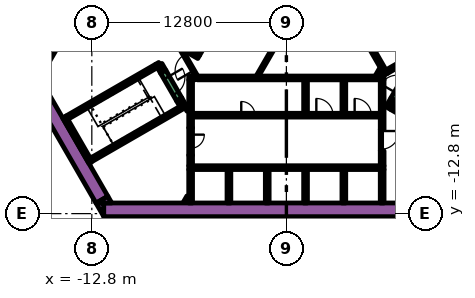
"""IFC4 building model, lengths in metres.
Left out: names, types, materials, properties, quantities, classifications, styles, units other than length and angle.
Written with IfcOpenShell. Run it as: python <this file> out.ifc"""

import sys

from ifc_helpers import new_model, si_unit, direction, frame, frame_2d, origin, place, context, subcontext, project, spatial, polyline, rectangle, outline, extrude, element, fill, save


model = new_model("IFC4")
c1 = context("Model", 3, precision=1e-05, world=origin(), true_north=direction((0.0, 1.0)))
c2 = subcontext(c1, "Body", "Model", "MODEL_VIEW")
j1 = project(units=[si_unit("LENGTHUNIT", "METRE"), si_unit("PLANEANGLEUNIT", "RADIAN")], contexts=[c1])
p1 = place(None, origin())
s1 = spatial("IfcSite", under=j1, at=p1, CompositionType="ELEMENT")
p2 = place(p1, origin())
s2 = spatial("IfcBuilding", under=s1, at=p2, CompositionType="ELEMENT")
p3 = place(p2, frame((0.0, 0.0, 11.4)))
s3 = spatial("IfcBuildingStorey", under=s2, at=p3, CompositionType="ELEMENT", Elevation=11.4)
p4 = place(p3, frame((6.776, 13.364, 0.0), z_axis=(0.0, 0.0, 1.0), x_axis=(0.500004177138, -0.8660229921, 0.0)))
e1 = element("IfcWall", 1, at=p4, inside=s3, PredefinedType="SOLIDWALL", context=c2, shape_type="SweptSolid", body=[
    extrude(rectangle(XDim=20.204, YDim=0.9, at=frame_2d((10.102, 0.0))), origin(), (0.0, 0.0, 1.0), 4.8),
])
p5 = place(p3, frame((-12.019, -12.55, 0.0), z_axis=(0.0, 0.0, 1.0), x_axis=(1.0, 0.0, 0.0)))
e2 = element("IfcWall", 2, at=p5, inside=s3, PredefinedType="SOLIDWALL", context=c2, shape_type="SweptSolid", body=[
    extrude(rectangle(XDim=21.63, YDim=0.9, at=frame_2d((10.815, 0.0))), origin(), (0.0, 0.0, 1.0), 4.8),
])
p6 = place(p3, origin())
e3 = element("IfcWall", 3, at=p6, inside=s3, PredefinedType="SOLIDWALL", context=c2, shape_type="SweptSolid", body=[
    extrude(outline(polyline([(-12.529, -12.1), (-12.021, -12.1), (-12.021, -12.98), (-12.529, -12.1)])), origin(), (0.0, 0.0, 1.0), 4.8),
])
p7 = place(p3, frame((-12.134, -11.883, 0.0), z_axis=(0.0, 0.0, 1.0), x_axis=(-0.500005339912, 0.866022320763, 0.0)))
e4 = element("IfcWall", 4, at=p7, inside=s3, PredefinedType="SOLIDWALL", context=c2, shape_type="SweptSolid", body=[
    extrude(rectangle(XDim=9.488, YDim=0.9, at=frame_2d((4.744, 0.0))), origin(), (0.0, 0.0, 1.0), 4.8),
])
e5 = element("IfcWall", 5, at=p6, inside=s3, PredefinedType="SOLIDWALL", context=c2, shape_type="SweptSolid", body=[
    extrude(outline(polyline([(-11.489, -12.1), (-12.505, -12.1), (-11.743, -11.66), (-11.489, -12.1)])), origin(), (0.0, 0.0, 1.0), 4.8),
])
p8 = place(p3, frame((12.84, -9.261, 0.0), z_axis=(0.0, 0.0, 1.0), x_axis=(-0.866013990052, 0.500019768644, 0.0)))
e6 = element("IfcWall", 6, at=p8, inside=s3, PredefinedType="SOLIDWALL", context=c2, shape_type="SweptSolid", body=[
    extrude(rectangle(XDim=6.8, YDim=0.25, at=frame_2d((3.4, 0.0))), origin(), (0.0, 0.0, 1.0), 4.8),
])
p9 = place(p3, frame((6.78, -5.906, 0.0), z_axis=(0.0, 0.0, 1.0), x_axis=(0.500223362819, 0.865896406789, 0.0)))
e7 = element("IfcWall", 7, at=p9, inside=s3, PredefinedType="SOLIDWALL", context=c2, shape_type="SweptSolid", body=[
    extrude(rectangle(XDim=0.675, YDim=0.25, at=frame_2d((0.337, 0.0))), origin(), (0.0, 0.0, 1.0), 4.8),
])
p10 = place(p3, frame((-12.885, -9.431, 0.0), z_axis=(0.0, 0.0, 1.0), x_axis=(-0.500020560727, 0.866013532718, 0.0)))
e8 = element("IfcWall", 8, at=p10, inside=s3, PredefinedType="SOLIDWALL", context=c2, shape_type="SweptSolid", body=[
    extrude(rectangle(XDim=3.45, YDim=0.25, at=frame_2d((1.725, 0.0))), origin(), (0.0, 0.0, 1.0), 4.8),
])
p11 = place(p3, frame((-14.44, -6.49, 0.0), z_axis=(0.0, 0.0, 1.0), x_axis=(0.866022966069, 0.500004222222, 0.0)))
e9 = element("IfcWall", 9, at=p11, inside=s3, PredefinedType="SOLIDWALL", context=c2, shape_type="SweptSolid", body=[
    extrude(rectangle(XDim=6.8, YDim=0.25, at=frame_2d((3.4, 0.0))), origin(), (0.0, 0.0, 1.0), 4.8),
])
p12 = place(p3, frame((-8.168, -3.503, 0.0), z_axis=(0.0, 0.0, 1.0), x_axis=(-0.499952099219, 0.866053057547, 0.0)))
e10 = element("IfcWall", 10, at=p12, inside=s3, PredefinedType="SOLIDWALL", context=c2, shape_type="SweptSolid", body=[
    extrude(rectangle(XDim=0.675, YDim=0.25, at=frame_2d((0.337, 0.0))), origin(), (0.0, 0.0, 1.0), 4.8),
])
p13 = place(p3, frame((-12.84, -9.261, 0.0), z_axis=(0.0, 0.0, 1.0), x_axis=(0.866016039709, 0.500016218704, 0.0)))
e11 = element("IfcWall", 11, at=p13, inside=s3, PredefinedType="SOLIDWALL", context=c2, shape_type="SweptSolid", body=[
    extrude(rectangle(XDim=7.05, YDim=0.25, at=frame_2d((3.525, 0.0))), origin(), (0.0, 0.0, 1.0), 4.8),
])
p14 = place(p3, frame((-6.905, -5.69, 0.0), z_axis=(0.0, 0.0, 1.0), x_axis=(-0.500402024738, 0.865793170242, 0.0)))
e12 = element("IfcWall", 12, at=p14, inside=s3, PredefinedType="SOLIDWALL", context=c2, shape_type="SweptSolid", body=[
    extrude(rectangle(XDim=0.425, YDim=0.25, at=frame_2d((0.212, 0.0))), origin(), (0.0, 0.0, 1.0), 4.8),
])
p15 = place(p3, frame((-6.425, -9.775, 0.0), z_axis=(0.0, 0.0, 1.0), x_axis=(1.0, 0.0, 0.0)))
e13 = element("IfcWall", 13, at=p15, inside=s3, PredefinedType="SOLIDWALL", context=c2, shape_type="SweptSolid", body=[
    extrude(rectangle(XDim=12.85, YDim=0.25, at=frame_2d((6.425, 0.0))), origin(), (0.0, 0.0, 1.0), 4.8),
])
p16 = place(p3, frame((-6.3, -9.9, 0.0), z_axis=(0.0, 0.0, 1.0), x_axis=(0.0, -1.0, 0.0)))
e14 = element("IfcWall", 14, at=p16, inside=s3, PredefinedType="SOLIDWALL", context=c2, shape_type="SweptSolid", body=[
    extrude(rectangle(XDim=2.2, YDim=0.25, at=frame_2d((1.1, 0.0))), origin(), (0.0, 0.0, 1.0), 4.8),
])
p17 = place(p3, frame((-6.3, -9.65, 0.0), z_axis=(0.0, 0.0, 1.0), x_axis=(0.0, 1.0, 0.0)))
e15 = element("IfcWall", 15, at=p17, inside=s3, PredefinedType="SOLIDWALL", context=c2, shape_type="SweptSolid", body=[
    extrude(rectangle(XDim=0.695, YDim=0.25, at=frame_2d((0.348, 0.0))), origin(), (0.0, 0.0, 1.0), 4.8),
])
p18 = place(p3, frame((-5.845, -3.875, 0.0), z_axis=(0.0, 0.0, 1.0), x_axis=(1.0, 0.0, 0.0)))
e16 = element("IfcWall", 16, at=p18, inside=s3, PredefinedType="SOLIDWALL", context=c2, shape_type="SweptSolid", body=[
    extrude(rectangle(XDim=12.27, YDim=0.25, at=frame_2d((6.135, 0.0))), origin(), (0.0, 0.0, 1.0), 4.8),
])
p19 = place(p3, frame((-6.425, -3.875, 0.0), z_axis=(0.0, 0.0, 1.0), x_axis=(1.0, 0.0, 0.0)))
e17 = element("IfcWall", 17, at=p19, inside=s3, PredefinedType="SOLIDWALL", context=c2, shape_type="SweptSolid", body=[
    extrude(rectangle(XDim=0.428, YDim=0.25, at=frame_2d((0.214, 0.0))), origin(), (0.0, 0.0, 1.0), 4.8),
])
p20 = place(p3, frame((6.3, -7.27, 0.0), z_axis=(0.0, 0.0, 1.0), x_axis=(0.0, 1.0, 0.0)))
e18 = element("IfcWall", 18, at=p20, inside=s3, PredefinedType="SOLIDWALL", context=c2, shape_type="SweptSolid", body=[
    extrude(rectangle(XDim=3.27, YDim=0.25, at=frame_2d((1.635, 0.0))), origin(), (0.0, 0.0, 1.0), 4.8),
])
p21 = place(p3, frame((6.3, -8.672, 0.0), z_axis=(0.0, 0.0, 1.0), x_axis=(0.0, -1.0, 0.0)))
e19 = element("IfcWall", 19, at=p21, inside=s3, PredefinedType="SOLIDWALL", context=c2, shape_type="SweptSolid", body=[
    extrude(rectangle(XDim=0.978, YDim=0.25, at=frame_2d((0.489, 0.0))), origin(), (0.0, 0.0, 1.0), 4.8),
])
for number, where, z_axis, x_axis in (
    (20, (3.78, -4.0, 0.0), (0.0, 0.0, 1.0), (0.0, -1.0, 0.0)),
    (21, (1.26, -4.0, 0.0), (0.0, 0.0, 1.0), (0.0, -1.0, 0.0)),
):
    element("IfcWall", number, at=place(p3, frame(where, z_axis=z_axis, x_axis=x_axis)), inside=s3, PredefinedType="SOLIDWALL", context=c2, shape_type="SweptSolid", body=[
        extrude(rectangle(XDim=2.2, YDim=0.25, at=frame_2d((1.1, 0.0))), origin(), (0.0, 0.0, 1.0), 4.8),
    ])
p22 = place(p3, frame((-6.3, -4.0, 0.0), z_axis=(0.0, 0.0, 1.0), x_axis=(0.0, -1.0, 0.0)))
e22 = element("IfcWall", 22, at=p22, inside=s3, PredefinedType="SOLIDWALL", context=c2, shape_type="SweptSolid", body=[
    extrude(rectangle(XDim=3.154, YDim=0.25, at=frame_2d((1.577, 0.0))), origin(), (0.0, 0.0, 1.0), 4.8),
])
for number, where, z_axis, x_axis in (
    (23, (6.3, -9.9, 0.0), (0.0, 0.0, 1.0), (0.0, -1.0, 0.0)),
    (24, (3.78, -9.9, 0.0), (0.0, 0.0, 1.0), (0.0, -1.0, 0.0)),
    (25, (1.26, -9.9, 0.0), (0.0, 0.0, 1.0), (0.0, -1.0, 0.0)),
    (26, (-1.26, -9.9, 0.0), (0.0, 0.0, 1.0), (0.0, -1.0, 0.0)),
    (27, (-3.78, -9.9, 0.0), (0.0, 0.0, 1.0), (0.0, -1.0, 0.0)),
):
    element("IfcWall", number, at=place(p3, frame(where, z_axis=z_axis, x_axis=x_axis)), inside=s3, PredefinedType="SOLIDWALL", context=c2, shape_type="SweptSolid", body=[
        extrude(rectangle(XDim=2.2, YDim=0.25, at=frame_2d((1.1, 0.0))), origin(), (0.0, 0.0, 1.0), 4.8),
    ])
e28 = element("IfcWall", 28, at=p6, inside=s3, PredefinedType="SOLIDWALL", context=c2, shape_type="SweptSolid", body=[
    extrude(outline(polyline([(6.552, -3.348), (6.677, -3.564), (6.46, -3.689), (4.897, -0.981), (0.332, 6.925), (0.335, 6.925), (0.335, 6.925), (0.335, 6.925), (0.335, 7.075), (0.335, 7.075), (0.335, 7.075), (0.245, 7.075), (0.079, 7.363), (0.035, 7.439), (0.252, 7.564), (0.377, 7.348), (6.552, -3.348)])), origin(), (0.0, 0.0, 1.0), 4.8),
])
p23 = place(p3, frame((6.614, -3.456, 0.0), z_axis=(0.0, 0.0, 1.0), x_axis=(0.86602447079, 0.500001615989, 0.0)))
e29 = element("IfcWall", 29, at=p23, inside=s3, PredefinedType="SOLIDWALL", context=c2, shape_type="SweptSolid", body=[
    extrude(rectangle(XDim=3.154, YDim=0.25, at=frame_2d((1.577, 0.0))), origin(), (0.0, 0.0, 1.0), 4.8),
])
e30 = element("IfcWall", 30, at=p6, inside=s3, PredefinedType="SOLIDWALL", context=c2, shape_type="SweptSolid", body=[
    extrude(outline(polyline([(-5.922, -2.257), (-5.922, -2.257), (-5.705, -2.382), (-5.83, -2.598), (-6.829, -2.021), (-6.88, -1.934), (-6.88, -1.934), (-6.93, -1.963), (-7.952, -1.373), (-7.827, -1.156), (-5.922, -2.257)])), origin(), (0.0, 0.0, 1.0), 4.8),
])
p24 = place(p3, frame((-6.708, -12.068, 0.0), z_axis=(0.0, 0.0, 1.0), x_axis=(0.500000789788, 0.8660249478, 0.0)))
e31 = element("IfcWall", 31, at=p24, inside=s3, PredefinedType="PARTITIONING", context=c2, shape_type="SweptSolid", body=[
    extrude(rectangle(XDim=0.456, YDim=0.15, at=frame_2d((0.228, 0.0))), origin(), (0.0, 0.0, 1.0), 3.9),
])
p25 = place(p3, frame((-6.534, -12.068, 0.0), z_axis=(0.0, 0.0, 1.0), x_axis=(0.500240224089, 0.865886665912, 0.0)))
e32 = element("IfcWall", 32, at=p25, inside=s3, PredefinedType="PARTITIONING", context=c2, shape_type="SweptSolid", body=[
    extrude(rectangle(XDim=0.109, YDim=0.15, at=frame_2d((0.054, 0.0))), origin(), (0.0, 0.0, 1.0), 3.9),
])
p26 = place(p3, frame((-6.48, -6.027, 0.0), z_axis=(0.0, 0.0, 1.0), x_axis=(-0.499927229454, 0.866067413802, 0.0)))
e33 = element("IfcWall", 33, at=p26, inside=s3, PredefinedType="PARTITIONING", context=c2, shape_type="SweptSolid", body=[
    extrude(rectangle(XDim=0.929, YDim=0.15, at=frame_2d((0.464, 0.0))), origin(), (0.0, 0.0, 1.0), 4.8),
])
for number, where, z_axis, x_axis in (
    (34, (-8.252, -2.958, 0.0), (0.0, 0.0, 1.0), (0.5, -0.866, 0.0)),
    (35, (6.945, -5.222, 0.0), (0.0, 0.0, 1.0), (-0.5, -0.866, 0.0)),
):
    element("IfcWall", number, at=place(p3, frame(where, z_axis=z_axis, x_axis=x_axis)), inside=s3, PredefinedType="PARTITIONING", context=c2, shape_type="SweptSolid", body=[
        extrude(rectangle(XDim=0.514, YDim=0.15, at=frame_2d((0.257, 0.0))), origin(), (0.0, 0.0, 1.0), 3.9),
    ])
p27 = place(p3, frame((5.936, -3.718, 0.0), z_axis=(0.0, 0.0, 1.0), x_axis=(0.499890179513, 0.866088799389, 0.0)))
e36 = element("IfcWall", 36, at=p27, inside=s3, PredefinedType="PARTITIONING", context=c2, shape_type="SweptSolid", body=[
    extrude(rectangle(XDim=0.504, YDim=0.15, at=frame_2d((0.252, 0.0))), origin(), (0.0, 0.0, 1.0), 3.9),
])
p28 = place(p3, frame((-1.887, -3.718, 0.0), z_axis=(0.0, 0.0, 1.0), x_axis=(0.500033287521, 0.866006184372, 0.0)))
e37 = element("IfcWall", 37, at=p28, inside=s3, PredefinedType="PARTITIONING", context=c2, shape_type="SweptSolid", body=[
    extrude(rectangle(XDim=3.263, YDim=0.15, at=frame_2d((1.632, 0.0))), origin(), (0.0, 0.0, 1.0), 3.9),
])
p29 = place(p3, frame((-6.175, -6.325, 0.0), z_axis=(0.0, 0.0, 1.0), x_axis=(1.0, 0.0, 0.0)))
e38 = element("IfcWall", 38, at=p29, inside=s3, PredefinedType="SOLIDWALL", context=c2, shape_type="SweptSolid", body=[
    extrude(rectangle(XDim=12.35, YDim=0.25, at=frame_2d((6.175, 0.0))), origin(), (0.0, 0.0, 1.0), 4.8),
])
p30 = place(p29, frame((3.205, 0.0, 0.0)))
e39 = element("IfcOpeningElement", 39, at=p30, cuts=e38, PredefinedType="OPENING", context=c2, shape_type="SweptSolid", body=[
    extrude(rectangle(XDim=0.9, YDim=2.1, at=frame_2d((0.45, 1.05))), frame((0.0, 0.135, 0.0), z_axis=(0.0, -1.0, 0.0), x_axis=(1.0, 0.0, 0.0)), (0.0, 0.0, 1.0), 0.27),
])
p31 = place(p29, frame((8.145, 0.0, 0.0)))
e40 = element("IfcOpeningElement", 40, at=p31, cuts=e38, PredefinedType="OPENING", context=c2, shape_type="SweptSolid", body=[
    extrude(rectangle(XDim=1.1, YDim=2.1, at=frame_2d((0.55, 1.05))), frame((0.0, 0.135, 0.0), z_axis=(0.0, -1.0, 0.0), x_axis=(1.0, 0.0, 0.0)), (0.0, 0.0, 1.0), 0.27),
])
p32 = place(p29, frame((10.665, 0.0, 0.0)))
e41 = element("IfcOpeningElement", 41, at=p32, cuts=e38, PredefinedType="OPENING", context=c2, shape_type="SweptSolid", body=[
    extrude(rectangle(XDim=1.1, YDim=2.1, at=frame_2d((0.55, 1.05))), frame((0.0, 0.135, 0.0), z_axis=(0.0, -1.0, 0.0), x_axis=(1.0, 0.0, 0.0)), (0.0, 0.0, 1.0), 0.27),
])
p33 = place(p3, frame((8.565, -2.185, 0.0), z_axis=(0.0, 0.0, 1.0), x_axis=(-0.499997954832, 0.866026584559, 0.0)))
e42 = element("IfcWall", 42, at=p33, inside=s3, PredefinedType="SOLIDWALL", context=c2, shape_type="SweptSolid", body=[
    extrude(rectangle(XDim=12.35, YDim=0.25, at=frame_2d((6.175, 0.0))), origin(), (0.0, 0.0, 1.0), 4.8),
])
p34 = place(p33, frame((5.725, 0.0, 0.0)))
e43 = element("IfcOpeningElement", 43, at=p34, cuts=e42, PredefinedType="OPENING", context=c2, shape_type="SweptSolid", body=[
    extrude(rectangle(XDim=0.9, YDim=2.1, at=frame_2d((0.45, 1.05))), frame((0.0, 0.135, 0.0), z_axis=(0.0, -1.0, 0.0), x_axis=(1.0, 0.0, 0.0)), (0.0, 0.0, 1.0), 0.27),
])
p35 = place(p3, frame((-0.898, 6.194, 0.0), z_axis=(0.0, 0.0, 1.0), x_axis=(-0.499996202215, -0.866027596426, 0.0)))
e44 = element("IfcWall", 44, at=p35, inside=s3, PredefinedType="SOLIDWALL", context=c2, shape_type="SweptSolid", body=[
    extrude(rectangle(XDim=9.83, YDim=0.25, at=frame_2d((4.915, 0.0))), origin(), (0.0, 0.0, 1.0), 4.8),
])
p36 = place(p35, frame((0.585, 0.0, 0.0)))
e45 = element("IfcOpeningElement", 45, at=p36, cuts=e44, PredefinedType="OPENING", context=c2, shape_type="SweptSolid", body=[
    extrude(rectangle(XDim=1.1, YDim=2.1, at=frame_2d((0.55, 1.05))), frame((0.0, 0.135, 0.0), z_axis=(0.0, -1.0, 0.0), x_axis=(1.0, 0.0, 0.0)), (0.0, 0.0, 1.0), 0.27),
])
p37 = place(p35, frame((3.105, 0.0, 0.0)))
e46 = element("IfcOpeningElement", 46, at=p37, cuts=e44, PredefinedType="OPENING", context=c2, shape_type="SweptSolid", body=[
    extrude(rectangle(XDim=1.1, YDim=2.1, at=frame_2d((0.55, 1.05))), frame((0.0, 0.135, 0.0), z_axis=(0.0, -1.0, 0.0), x_axis=(1.0, 0.0, 0.0)), (0.0, 0.0, 1.0), 0.27),
])
p38 = place(p35, frame((5.625, 0.0, 0.0)))
e47 = element("IfcOpeningElement", 47, at=p38, cuts=e44, PredefinedType="OPENING", context=c2, shape_type="SweptSolid", body=[
    extrude(rectangle(XDim=1.1, YDim=2.1, at=frame_2d((0.55, 1.05))), frame((0.0, 0.135, 0.0), z_axis=(0.0, -1.0, 0.0), x_axis=(1.0, 0.0, 0.0)), (0.0, 0.0, 1.0), 0.27),
])
p39 = place(p35, frame((8.145, 0.0, 0.0)))
e48 = element("IfcOpeningElement", 48, at=p39, cuts=e44, PredefinedType="OPENING", context=c2, shape_type="SweptSolid", body=[
    extrude(rectangle(XDim=1.1, YDim=2.1, at=frame_2d((0.55, 1.05))), frame((0.0, 0.135, 0.0), z_axis=(0.0, -1.0, 0.0), x_axis=(1.0, 0.0, 0.0)), (0.0, 0.0, 1.0), 0.27),
])
p40 = place(p3, frame((7.053, -5.284, 0.0), z_axis=(0.0, 0.0, 1.0), x_axis=(0.500078061341, 0.865980330357, 0.0)))
e49 = element("IfcWall", 49, at=p40, inside=s3, PredefinedType="SOLIDWALL", context=c2, shape_type="SweptSolid", body=[
    extrude(rectangle(XDim=2.1, YDim=0.4, at=frame_2d((1.05, 0.0))), origin(), (0.0, 0.0, 1.0), 4.8),
])
p41 = place(p40, frame((0.45, 0.0, 0.0)))
e50 = element("IfcOpeningElement", 50, at=p41, cuts=e49, PredefinedType="OPENING", context=c2, shape_type="SweptSolid", body=[
    extrude(rectangle(XDim=1.2, YDim=2.1, at=frame_2d((0.6, 1.05))), frame((0.0, 0.21, 0.0), z_axis=(0.0, -1.0, 0.0), x_axis=(1.0, 0.0, 0.0)), (0.0, 0.0, 1.0), 0.42),
])
p42 = place(p3, frame((-8.103, -3.466, 0.0), z_axis=(0.0, 0.0, 1.0), x_axis=(0.500078061341, -0.865980330357, 0.0)))
e51 = element("IfcWall", 51, at=p42, inside=s3, PredefinedType="SOLIDWALL", context=c2, shape_type="SweptSolid", body=[
    extrude(rectangle(XDim=2.1, YDim=0.4, at=frame_2d((1.05, 0.0))), origin(), (0.0, 0.0, 1.0), 4.8),
])
p43 = place(p42, frame((0.45, 0.0, 0.0)))
e52 = element("IfcOpeningElement", 52, at=p43, cuts=e51, PredefinedType="OPENING", context=c2, shape_type="SweptSolid", body=[
    extrude(rectangle(XDim=1.2, YDim=2.1, at=frame_2d((0.6, 1.05))), frame((0.0, 0.21, 0.0), z_axis=(0.0, -1.0, 0.0), x_axis=(1.0, 0.0, 0.0)), (0.0, 0.0, 1.0), 0.42),
])
p44 = place(p3, frame((-6.3, -7.154, 0.0), z_axis=(0.0, 0.0, 1.0), x_axis=(0.0, -1.0, 0.0)))
e53 = element("IfcWall", 53, at=p44, inside=s3, PredefinedType="SOLIDWALL", context=c2, shape_type="SweptSolid", body=[
    extrude(rectangle(XDim=1.8, YDim=0.25, at=frame_2d((0.9, 0.0))), origin(), (0.0, 0.0, 1.0), 4.8),
])
p45 = place(p44, frame((0.45, 0.0, 0.0)))
e54 = element("IfcOpeningElement", 54, at=p45, cuts=e53, PredefinedType="OPENING", context=c2, shape_type="SweptSolid", body=[
    extrude(rectangle(XDim=0.9, YDim=2.1, at=frame_2d((0.45, 1.05))), frame((0.0, 0.135, 0.0), z_axis=(0.0, -1.0, 0.0), x_axis=(1.0, 0.0, 0.0)), (0.0, 0.0, 1.0), 0.27),
])
p46 = place(p3, frame((-5.895, -3.79, 0.0), z_axis=(0.0, 0.0, 1.0), x_axis=(-0.49994051562, 0.866059744384, 0.0)))
e55 = element("IfcWall", 55, at=p46, inside=s3, PredefinedType="PARTITIONING", context=c2, shape_type="SweptSolid", body=[
    extrude(rectangle(XDim=2.1, YDim=0.15, at=frame_2d((1.05, 0.0))), origin(), (0.0, 0.0, 1.0), 3.9),
])
p47 = place(p46, frame((0.45, 0.0, 0.0)))
e56 = element("IfcOpeningElement", 56, at=p47, cuts=e55, PredefinedType="OPENING", context=c2, shape_type="SweptSolid", body=[
    extrude(rectangle(XDim=1.2, YDim=2.1, at=frame_2d((0.6, 1.05))), frame((0.0, 0.085, 0.0), z_axis=(0.0, -1.0, 0.0), x_axis=(1.0, 0.0, 0.0)), (0.0, 0.0, 1.0), 0.17),
])
p48 = place(p3, frame((6.22, -7.266, 0.0), z_axis=(0.0, 0.0, 1.0), x_axis=(0.0, -1.0, 0.0)))
e57 = element("IfcWall", 57, at=p48, inside=s3, PredefinedType="PARTITIONING", context=c2, shape_type="SweptSolid", body=[
    extrude(rectangle(XDim=1.4, YDim=0.09, at=frame_2d((0.7, 0.0))), origin(), (0.0, 0.0, 1.0), 3.9),
])
p49 = place(p48, frame((0.1, 0.0, 0.0)))
e58 = element("IfcOpeningElement", 58, at=p49, cuts=e57, PredefinedType="OPENING", context=c2, shape_type="SweptSolid", body=[
    extrude(rectangle(XDim=1.2, YDim=2.1, at=frame_2d((0.6, 1.05))), frame((0.0, 0.055, 0.0), z_axis=(0.0, -1.0, 0.0), x_axis=(1.0, 0.0, 0.0)), (0.0, 0.0, 1.0), 0.11),
])
p50 = place(p3, frame((-16.209, -2.976, 0.0), z_axis=(0.0, 0.0, 1.0), x_axis=(0.499954529098, 0.86605165483, 0.0)))
e59 = element("IfcWall", 59, at=p50, inside=s3, PredefinedType="SOLIDWALL", context=c2, shape_type="SweptSolid", body=[
    extrude(rectangle(XDim=1.7, YDim=0.9, at=frame_2d((0.85, 0.0))), origin(), (0.0, 0.0, 1.0), 4.8),
])
p51 = place(p50, frame((0.25, 0.0, 0.0)))
e60 = element("IfcOpeningElement", 60, at=p51, cuts=e59, PredefinedType="OPENING", context=c2, shape_type="SweptSolid", body=[
    extrude(rectangle(XDim=1.2, YDim=2.1, at=frame_2d((0.6, 1.05))), frame((0.0, 0.46, 0.0), z_axis=(0.0, -1.0, 0.0), x_axis=(1.0, 0.0, 0.0)), (0.0, 0.0, 1.0), 0.92),
])
p52 = place(p30, origin())
e61 = element("IfcDoor", 61, at=p52, inside=s3, OperationType="SINGLE_SWING_LEFT", PredefinedType="DOOR", context=c2, shape_type="SweptSolid", body=[
    extrude(rectangle(XDim=0.9, YDim=2.1, at=frame_2d((0.45, 1.05))), frame((0.0, 0.025, 0.0), z_axis=(0.0, -1.0, 0.0), x_axis=(1.0, 0.0, 0.0)), (0.0, 0.0, 1.0), 0.05),
])
fill(e39, e61)
p53 = place(p31, origin())
e62 = element("IfcDoor", 62, at=p53, inside=s3, OperationType="DOUBLE_DOOR_SLIDING", PredefinedType="DOOR", context=c2, shape_type="SweptSolid", body=[
    extrude(rectangle(XDim=1.1, YDim=2.1, at=frame_2d((0.55, 1.05))), frame((0.0, 0.025, 0.0), z_axis=(0.0, -1.0, 0.0), x_axis=(1.0, 0.0, 0.0)), (0.0, 0.0, 1.0), 0.05),
])
fill(e40, e62)
p54 = place(p32, origin())
e63 = element("IfcDoor", 63, at=p54, inside=s3, OperationType="DOUBLE_DOOR_SLIDING", PredefinedType="DOOR", context=c2, shape_type="SweptSolid", body=[
    extrude(rectangle(XDim=1.1, YDim=2.1, at=frame_2d((0.55, 1.05))), frame((0.0, 0.025, 0.0), z_axis=(0.0, -1.0, 0.0), x_axis=(1.0, 0.0, 0.0)), (0.0, 0.0, 1.0), 0.05),
])
fill(e41, e63)
p55 = place(p43, origin())
e64 = element("IfcDoor", 64, at=p55, inside=s3, OperationType="SINGLE_SWING_LEFT", PredefinedType="DOOR", context=c2, shape_type="SweptSolid", body=[
    extrude(rectangle(XDim=1.2, YDim=2.1, at=frame_2d((0.6, 1.05))), frame((0.0, 0.025, 0.0), z_axis=(0.0, -1.0, 0.0), x_axis=(1.0, 0.0, 0.0)), (0.0, 0.0, 1.0), 0.05),
])
fill(e52, e64)
p56 = place(p45, origin())
e65 = element("IfcDoor", 65, at=p56, inside=s3, OperationType="SINGLE_SWING_LEFT", PredefinedType="DOOR", context=c2, shape_type="SweptSolid", body=[
    extrude(rectangle(XDim=0.9, YDim=2.1, at=frame_2d((0.45, 1.05))), frame((0.0, 0.025, 0.0), z_axis=(0.0, -1.0, 0.0), x_axis=(1.0, 0.0, 0.0)), (0.0, 0.0, 1.0), 0.05),
])
fill(e54, e65)
p57 = place(p47, origin())
e66 = element("IfcDoor", 66, at=p57, inside=s3, OperationType="SINGLE_SWING_LEFT", PredefinedType="DOOR", context=c2, shape_type="SweptSolid", body=[
    extrude(rectangle(XDim=1.2, YDim=2.1, at=frame_2d((0.6, 1.05))), frame((0.0, 0.025, 0.0), z_axis=(0.0, -1.0, 0.0), x_axis=(1.0, 0.0, 0.0)), (0.0, 0.0, 1.0), 0.05),
])
fill(e56, e66)
p58 = place(p49, origin())
e67 = element("IfcDoor", 67, at=p58, inside=s3, OperationType="SINGLE_SWING_LEFT", PredefinedType="DOOR", context=c2, shape_type="SweptSolid", body=[
    extrude(rectangle(XDim=1.2, YDim=2.1, at=frame_2d((0.6, 1.05))), frame((0.0, 0.025, 0.0), z_axis=(0.0, -1.0, 0.0), x_axis=(1.0, 0.0, 0.0)), (0.0, 0.0, 1.0), 0.05),
])
fill(e58, e67)
save(model, sys.argv[1])
